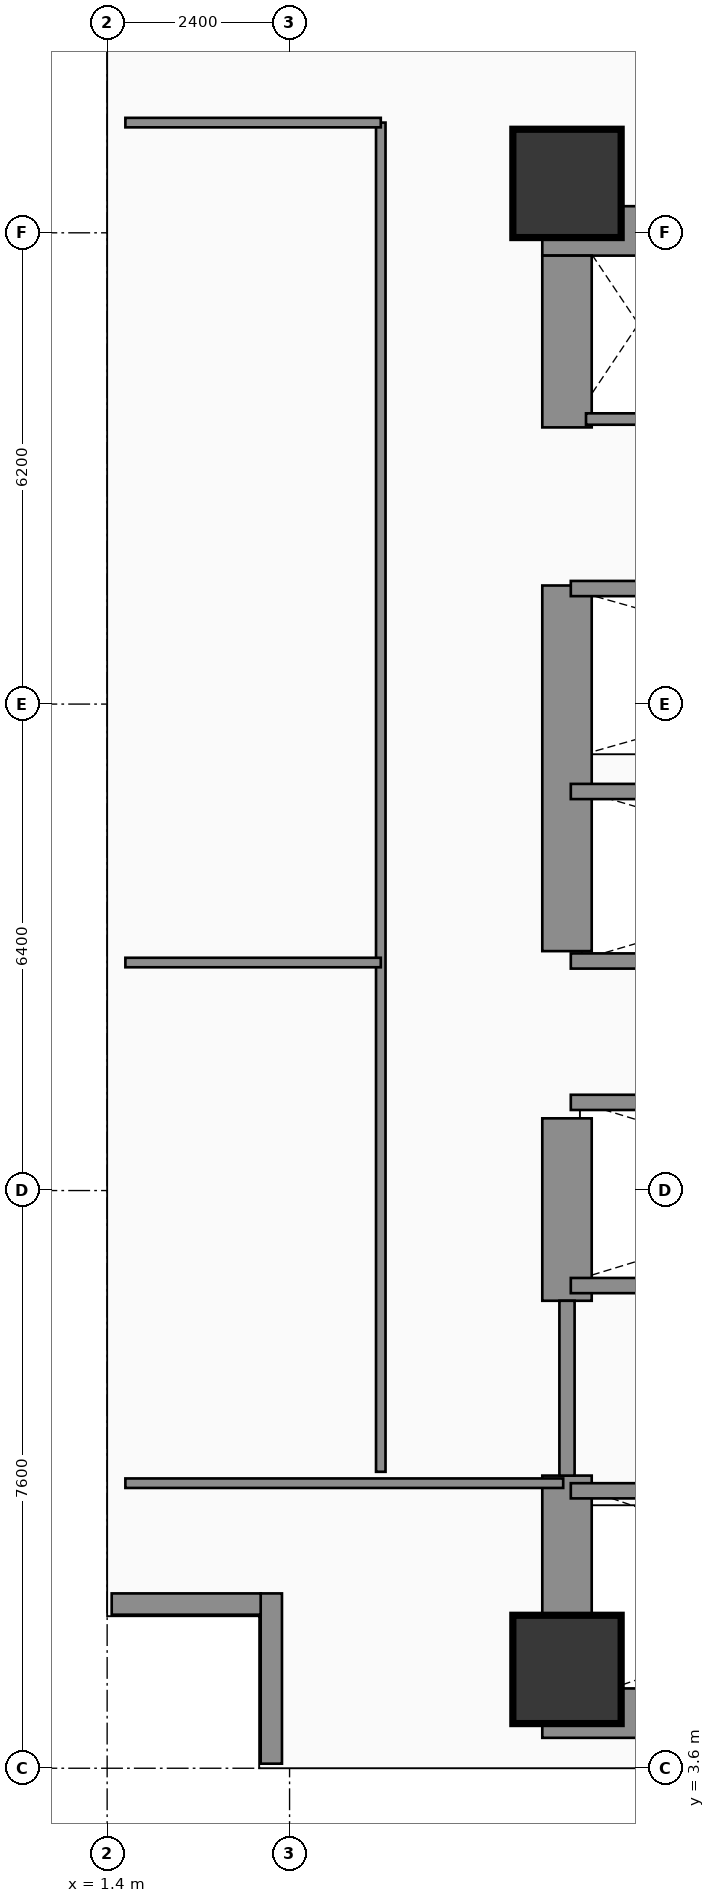
"""IFC4 building model, lengths in metres.
Left out: names, types, materials, properties, quantities, classifications, styles, units other than length and angle.
Written with IfcOpenShell. Run it as: python <this file> out.ifc"""

import sys

from ifc_helpers import new_model, si_unit, direction, frame, frame_2d, origin, origin_2d, place, context, subcontext, project, spatial, rectangle, extrude, element, fill, save


model = new_model("IFC4")
c1 = context("Model", 3, precision=1e-05, world=origin(), true_north=direction((0.0, 1.0)))
c2 = subcontext(c1, "Body", "Model", "MODEL_VIEW")
j1 = project(units=[si_unit("LENGTHUNIT", "METRE"), si_unit("PLANEANGLEUNIT", "RADIAN")], contexts=[c1])
p1 = place(None, origin())
s1 = spatial("IfcSite", under=j1, at=p1, CompositionType="ELEMENT")
p2 = place(p1, origin())
s2 = spatial("IfcBuilding", under=s1, at=p2, CompositionType="ELEMENT")
p3 = place(p2, frame((0.0, 0.0, 110.7)))
s3 = spatial("IfcBuildingStorey", under=s2, at=p3, CompositionType="ELEMENT", Elevation=110.7)
for number, where, z_axis, x_axis in (
    (1, (7.125, 4.325, 0.0), (0.0, 0.0, 1.0), (1.0, 0.0, 0.0)),
    (2, (7.125, 23.825, 0.0), (0.0, 0.0, 1.0), (1.0, 0.0, 0.0)),
):
    element("IfcWall", number, at=place(p3, frame(where, z_axis=z_axis, x_axis=x_axis)), inside=s3, PredefinedType="SHEAR", context=c2, shape_type="SweptSolid", body=[
        extrude(rectangle(XDim=14.0, YDim=0.65, at=frame_2d((7.0, 0.0))), origin(), (0.0, 0.0, 1.0), 3.54),
    ])
p4 = place(p3, frame((7.45, 4.65, 0.0), z_axis=(0.0, 0.0, 1.0), x_axis=(0.0, 1.0, 0.0)))
e3 = element("IfcWall", 3, at=p4, inside=s3, PredefinedType="SHEAR", context=c2, shape_type="SweptSolid", body=[
    extrude(rectangle(XDim=2.8, YDim=0.65, at=frame_2d((1.4, 0.0))), origin(), (0.0, 0.0, 1.0), 3.54),
])
p5 = place(p3, frame((7.45, 9.75, 0.0), z_axis=(0.0, 0.0, 1.0), x_axis=(0.0, 1.0, 0.0)))
e4 = element("IfcWall", 4, at=p5, inside=s3, PredefinedType="SHEAR", context=c2, shape_type="SweptSolid", body=[
    extrude(rectangle(XDim=2.4, YDim=0.65, at=frame_2d((1.2, 0.0))), origin(), (0.0, 0.0, 1.0), 3.54),
])
p6 = place(p3, frame((7.45, 14.35, 0.0), z_axis=(0.0, 0.0, 1.0), x_axis=(0.0, 1.0, 0.0)))
e5 = element("IfcWall", 5, at=p6, inside=s3, PredefinedType="SHEAR", context=c2, shape_type="SweptSolid", body=[
    extrude(rectangle(XDim=4.81, YDim=0.65, at=frame_2d((2.405, 0.0))), origin(), (0.0, 0.0, 1.0), 3.54),
])
p7 = place(p3, frame((7.45, 21.24, 0.0), z_axis=(0.0, 0.0, 1.0), x_axis=(0.0, 1.0, 0.0)))
e6 = element("IfcWall", 6, at=p7, inside=s3, PredefinedType="SHEAR", context=c2, shape_type="SweptSolid", body=[
    extrude(rectangle(XDim=2.26, YDim=0.65, at=frame_2d((1.13, 0.0))), origin(), (0.0, 0.0, 1.0), 3.54),
])
for number, where, z_axis, x_axis in (
    (7, (7.45, 4.9, 0.0), (0.0, 0.0, 1.0), (1.0, 0.0, 0.0)),
    (8, (7.45, 24.45, 0.0), (0.0, 0.0, 1.0), (1.0, 0.0, 0.0)),
):
    element("IfcColumn", number, at=place(p3, frame(where, z_axis=z_axis, x_axis=x_axis)), inside=s3, PredefinedType="COLUMN", context=c2, shape_type="SweptSolid", body=[
        extrude(rectangle(XDim=1.4, YDim=1.4, at=origin_2d()), origin(), (0.0, 0.0, 1.0), 3.54),
    ])
p8 = place(p3, frame((3.56, 3.66, 0.0), z_axis=(0.0, 0.0, 1.0), x_axis=(0.0, 1.0, 0.0)))
e9 = element("IfcWall", 9, at=p8, inside=s3, PredefinedType="SOLIDWALL", context=c2, shape_type="SweptSolid", body=[
    extrude(rectangle(XDim=2.24, YDim=0.28, at=frame_2d((1.12, 0.0))), origin(), (0.0, 0.0, 1.0), 3.54),
])
p9 = place(p3, frame((1.46, 5.76, 0.0), z_axis=(0.0, 0.0, 1.0), x_axis=(1.0, 0.0, 0.0)))
e10 = element("IfcWall", 10, at=p9, inside=s3, PredefinedType="SOLIDWALL", context=c2, shape_type="SweptSolid", body=[
    extrude(rectangle(XDim=1.96, YDim=0.28, at=frame_2d((0.98, 0.0))), origin(), (0.0, 0.0, 1.0), 3.54),
])
p10 = place(p3, frame((7.5, 7.25, 0.0), z_axis=(0.0, 0.0, 1.0), x_axis=(1.0, 0.0, 0.0)))
e11 = element("IfcWall", 11, at=p10, inside=s3, PredefinedType="PARTITIONING", context=c2, shape_type="SweptSolid", body=[
    extrude(rectangle(XDim=8.35, YDim=0.2, at=frame_2d((4.175, 0.0))), origin(), (0.0, 0.0, 1.0), 3.54),
])
p11 = place(p10, frame((0.53, 0.0, 0.0)))
e12 = element("IfcOpeningElement", 12, at=p11, cuts=e11, PredefinedType="OPENING", context=c2, shape_type="SweptSolid", body=[
    extrude(rectangle(XDim=1.1, YDim=2.2, at=frame_2d((0.55, 1.1))), frame((0.0, 0.11, 0.0), z_axis=(0.0, -1.0, 0.0), x_axis=(1.0, 0.0, 0.0)), (0.0, 0.0, 1.0), 0.22),
])
p12 = place(p10, frame((2.37, 0.0, 0.0)))
e13 = element("IfcOpeningElement", 13, at=p12, cuts=e11, PredefinedType="OPENING", context=c2, shape_type="SweptSolid", body=[
    extrude(rectangle(XDim=1.1, YDim=2.2, at=frame_2d((0.55, 1.1))), frame((0.0, 0.11, 0.0), z_axis=(0.0, -1.0, 0.0), x_axis=(1.0, 0.0, 0.0)), (0.0, 0.0, 1.0), 0.22),
])
p13 = place(p10, frame((4.33, 0.0, 0.0)))
e14 = element("IfcOpeningElement", 14, at=p13, cuts=e11, PredefinedType="OPENING", context=c2, shape_type="SweptSolid", body=[
    extrude(rectangle(XDim=1.1, YDim=2.2, at=frame_2d((0.55, 1.1))), frame((0.0, 0.11, 0.0), z_axis=(0.0, -1.0, 0.0), x_axis=(1.0, 0.0, 0.0)), (0.0, 0.0, 1.0), 0.22),
])
p14 = place(p10, frame((6.5, 0.0, 0.0)))
e15 = element("IfcOpeningElement", 15, at=p14, cuts=e11, PredefinedType="OPENING", context=c2, shape_type="SweptSolid", body=[
    extrude(rectangle(XDim=1.1, YDim=2.2, at=frame_2d((0.55, 1.1))), frame((0.0, 0.11, 0.0), z_axis=(0.0, -1.0, 0.0), x_axis=(1.0, 0.0, 0.0)), (0.0, 0.0, 1.0), 0.22),
])
p15 = place(p3, frame((7.5, 9.95, 0.0), z_axis=(0.0, 0.0, 1.0), x_axis=(1.0, 0.0, 0.0)))
e16 = element("IfcWall", 16, at=p15, inside=s3, PredefinedType="PARTITIONING", context=c2, shape_type="SweptSolid", body=[
    extrude(rectangle(XDim=8.35, YDim=0.2, at=frame_2d((4.175, 0.0))), origin(), (0.0, 0.0, 1.0), 3.54),
])
p16 = place(p3, frame((7.45, 7.45, 0.0), z_axis=(0.0, 0.0, 1.0), x_axis=(0.0, 1.0, 0.0)))
e17 = element("IfcWall", 17, at=p16, inside=s3, PredefinedType="PARTITIONING", context=c2, shape_type="SweptSolid", body=[
    extrude(rectangle(XDim=2.3, YDim=0.2, at=frame_2d((1.15, 0.0))), origin(), (0.0, 0.0, 1.0), 2.52),
])
p17 = place(p16, frame((0.633, 0.0, 0.0)))
e18 = element("IfcOpeningElement", 18, at=p17, cuts=e17, PredefinedType="OPENING", context=c2, shape_type="SweptSolid", body=[
    extrude(rectangle(XDim=1.2, YDim=2.25, at=frame_2d((0.6, 1.125))), frame((0.0, 0.11, 0.0), z_axis=(0.0, -1.0, 0.0), x_axis=(1.0, 0.0, 0.0)), (0.0, 0.0, 1.0), 0.22),
])
p18 = place(p3, frame((7.5, 12.36, 0.0), z_axis=(0.0, 0.0, 1.0), x_axis=(1.0, 0.0, 0.0)))
e19 = element("IfcWall", 19, at=p18, inside=s3, PredefinedType="PARTITIONING", context=c2, shape_type="SweptSolid", body=[
    extrude(rectangle(XDim=7.85, YDim=0.2, at=frame_2d((3.925, 0.0))), origin(), (0.0, 0.0, 1.0), 3.54),
])
p19 = place(p18, frame((0.53, 0.0, 0.0)))
e20 = element("IfcOpeningElement", 20, at=p19, cuts=e19, PredefinedType="OPENING", context=c2, shape_type="SweptSolid", body=[
    extrude(rectangle(XDim=1.1, YDim=2.2, at=frame_2d((0.55, 1.1))), frame((0.0, 0.11, 0.0), z_axis=(0.0, -1.0, 0.0), x_axis=(1.0, 0.0, 0.0)), (0.0, 0.0, 1.0), 0.22),
])
p20 = place(p18, frame((2.42, 0.0, 0.0)))
e21 = element("IfcOpeningElement", 21, at=p20, cuts=e19, PredefinedType="OPENING", context=c2, shape_type="SweptSolid", body=[
    extrude(rectangle(XDim=1.1, YDim=2.2, at=frame_2d((0.55, 1.1))), frame((0.0, 0.11, 0.0), z_axis=(0.0, -1.0, 0.0), x_axis=(1.0, 0.0, 0.0)), (0.0, 0.0, 1.0), 0.22),
])
p21 = place(p18, frame((4.31, 0.0, 0.0)))
e22 = element("IfcOpeningElement", 22, at=p21, cuts=e19, PredefinedType="OPENING", context=c2, shape_type="SweptSolid", body=[
    extrude(rectangle(XDim=1.1, YDim=2.2, at=frame_2d((0.55, 1.1))), frame((0.0, 0.11, 0.0), z_axis=(0.0, -1.0, 0.0), x_axis=(1.0, 0.0, 0.0)), (0.0, 0.0, 1.0), 0.22),
])
p22 = place(p18, frame((6.2, 0.0, 0.0)))
e23 = element("IfcOpeningElement", 23, at=p22, cuts=e19, PredefinedType="OPENING", context=c2, shape_type="SweptSolid", body=[
    extrude(rectangle(XDim=1.1, YDim=2.2, at=frame_2d((0.55, 1.1))), frame((0.0, 0.11, 0.0), z_axis=(0.0, -1.0, 0.0), x_axis=(1.0, 0.0, 0.0)), (0.0, 0.0, 1.0), 0.22),
])
p23 = place(p3, frame((7.5, 14.22, 0.0), z_axis=(0.0, 0.0, 1.0), x_axis=(1.0, 0.0, 0.0)))
e24 = element("IfcWall", 24, at=p23, inside=s3, PredefinedType="PARTITIONING", context=c2, shape_type="SweptSolid", body=[
    extrude(rectangle(XDim=7.85, YDim=0.2, at=frame_2d((3.925, 0.0))), origin(), (0.0, 0.0, 1.0), 3.54),
])
p24 = place(p23, frame((0.53, 0.0, 0.0)))
e25 = element("IfcOpeningElement", 25, at=p24, cuts=e24, PredefinedType="OPENING", context=c2, shape_type="SweptSolid", body=[
    extrude(rectangle(XDim=1.1, YDim=2.2, at=frame_2d((0.55, 1.1))), frame((0.0, 0.11, 0.0), z_axis=(0.0, -1.0, 0.0), x_axis=(1.0, 0.0, 0.0)), (0.0, 0.0, 1.0), 0.22),
])
p25 = place(p23, frame((2.42, 0.0, 0.0)))
e26 = element("IfcOpeningElement", 26, at=p25, cuts=e24, PredefinedType="OPENING", context=c2, shape_type="SweptSolid", body=[
    extrude(rectangle(XDim=1.1, YDim=2.2, at=frame_2d((0.55, 1.1))), frame((0.0, 0.11, 0.0), z_axis=(0.0, -1.0, 0.0), x_axis=(1.0, 0.0, 0.0)), (0.0, 0.0, 1.0), 0.22),
])
p26 = place(p23, frame((4.31, 0.0, 0.0)))
e27 = element("IfcOpeningElement", 27, at=p26, cuts=e24, PredefinedType="OPENING", context=c2, shape_type="SweptSolid", body=[
    extrude(rectangle(XDim=1.1, YDim=2.2, at=frame_2d((0.55, 1.1))), frame((0.0, 0.11, 0.0), z_axis=(0.0, -1.0, 0.0), x_axis=(1.0, 0.0, 0.0)), (0.0, 0.0, 1.0), 0.22),
])
p27 = place(p23, frame((6.2, 0.0, 0.0)))
e28 = element("IfcOpeningElement", 28, at=p27, cuts=e24, PredefinedType="OPENING", context=c2, shape_type="SweptSolid", body=[
    extrude(rectangle(XDim=1.1, YDim=2.2, at=frame_2d((0.55, 1.1))), frame((0.0, 0.11, 0.0), z_axis=(0.0, -1.0, 0.0), x_axis=(1.0, 0.0, 0.0)), (0.0, 0.0, 1.0), 0.22),
])
p28 = place(p3, frame((7.5, 16.45, 0.0), z_axis=(0.0, 0.0, 1.0), x_axis=(1.0, 0.0, 0.0)))
e29 = element("IfcWall", 29, at=p28, inside=s3, PredefinedType="PARTITIONING", context=c2, shape_type="SweptSolid", body=[
    extrude(rectangle(XDim=7.85, YDim=0.2, at=frame_2d((3.925, 0.0))), origin(), (0.0, 0.0, 1.0), 3.54),
])
p29 = place(p3, frame((7.5, 19.12, 0.0), z_axis=(0.0, 0.0, 1.0), x_axis=(1.0, 0.0, 0.0)))
e30 = element("IfcWall", 30, at=p29, inside=s3, PredefinedType="PARTITIONING", context=c2, shape_type="SweptSolid", body=[
    extrude(rectangle(XDim=7.85, YDim=0.2, at=frame_2d((3.925, 0.0))), origin(), (0.0, 0.0, 1.0), 3.54),
])
p30 = place(p29, frame((0.53, 0.0, 0.0)))
e31 = element("IfcOpeningElement", 31, at=p30, cuts=e30, PredefinedType="OPENING", context=c2, shape_type="SweptSolid", body=[
    extrude(rectangle(XDim=1.1, YDim=2.2, at=frame_2d((0.55, 1.1))), frame((0.0, 0.11, 0.0), z_axis=(0.0, -1.0, 0.0), x_axis=(1.0, 0.0, 0.0)), (0.0, 0.0, 1.0), 0.22),
])
p31 = place(p29, frame((2.42, 0.0, 0.0)))
e32 = element("IfcOpeningElement", 32, at=p31, cuts=e30, PredefinedType="OPENING", context=c2, shape_type="SweptSolid", body=[
    extrude(rectangle(XDim=1.1, YDim=2.2, at=frame_2d((0.55, 1.1))), frame((0.0, 0.11, 0.0), z_axis=(0.0, -1.0, 0.0), x_axis=(1.0, 0.0, 0.0)), (0.0, 0.0, 1.0), 0.22),
])
p32 = place(p29, frame((4.31, 0.0, 0.0)))
e33 = element("IfcOpeningElement", 33, at=p32, cuts=e30, PredefinedType="OPENING", context=c2, shape_type="SweptSolid", body=[
    extrude(rectangle(XDim=1.1, YDim=2.2, at=frame_2d((0.55, 1.1))), frame((0.0, 0.11, 0.0), z_axis=(0.0, -1.0, 0.0), x_axis=(1.0, 0.0, 0.0)), (0.0, 0.0, 1.0), 0.22),
])
p33 = place(p29, frame((6.2, 0.0, 0.0)))
e34 = element("IfcOpeningElement", 34, at=p33, cuts=e30, PredefinedType="OPENING", context=c2, shape_type="SweptSolid", body=[
    extrude(rectangle(XDim=1.1, YDim=2.2, at=frame_2d((0.55, 1.1))), frame((0.0, 0.11, 0.0), z_axis=(0.0, -1.0, 0.0), x_axis=(1.0, 0.0, 0.0)), (0.0, 0.0, 1.0), 0.22),
])
p34 = place(p3, frame((7.7, 21.35, 0.0), z_axis=(0.0, 0.0, 1.0), x_axis=(1.0, 0.0, 0.0)))
e35 = element("IfcWall", 35, at=p34, inside=s3, PredefinedType="PARTITIONING", context=c2, shape_type="SweptSolid", body=[
    extrude(rectangle(XDim=1.55, YDim=0.15, at=frame_2d((0.775, 0.0))), origin(), (0.0, 0.0, 1.0), 3.54),
])
p35 = place(p34, frame((0.39, 0.0, 0.0)))
e36 = element("IfcOpeningElement", 36, at=p35, cuts=e35, PredefinedType="OPENING", context=c2, shape_type="SweptSolid", body=[
    extrude(rectangle(XDim=0.85, YDim=2.15, at=frame_2d((0.425, 1.075))), frame((0.0, 0.085, 0.0), z_axis=(0.0, -1.0, 0.0), x_axis=(1.0, 0.0, 0.0)), (0.0, 0.0, 1.0), 0.17),
])
p36 = place(p3, frame((1.64, 7.35, 0.0), z_axis=(0.0, 0.0, 1.0), x_axis=(1.0, 0.0, 0.0)))
e37 = element("IfcWall", 37, at=p36, inside=s3, PredefinedType="PARTITIONING", context=c2, shape_type="SweptSolid", body=[
    extrude(rectangle(XDim=5.76, YDim=0.125, at=frame_2d((2.88, 0.0))), origin(), (0.0, 0.0, 1.0), 3.54),
])
p37 = place(p36, frame((4.087, 0.0, 0.0)))
e38 = element("IfcOpeningElement", 38, at=p37, cuts=e37, PredefinedType="OPENING", context=c2, shape_type="SweptSolid", body=[
    extrude(rectangle(XDim=0.85, YDim=2.15, at=frame_2d((0.425, 1.075))), frame((0.0, 0.073, 0.0), z_axis=(0.0, -1.0, 0.0), x_axis=(1.0, 0.0, 0.0)), (0.0, 0.0, 1.0), 0.145),
])
p38 = place(p3, frame((5.0, 7.5, 0.0), z_axis=(0.0, 0.0, 1.0), x_axis=(0.0, 1.0, 0.0)))
e39 = element("IfcWall", 39, at=p38, inside=s3, PredefinedType="PARTITIONING", context=c2, shape_type="SweptSolid", body=[
    extrude(rectangle(XDim=17.75, YDim=0.125, at=frame_2d((8.875, 0.0))), origin(), (0.0, 0.0, 1.0), 3.54),
])
p39 = place(p38, frame((2.85, 0.0, 0.0)))
e40 = element("IfcOpeningElement", 40, at=p39, cuts=e39, PredefinedType="OPENING", context=c2, shape_type="SweptSolid", body=[
    extrude(rectangle(XDim=0.95, YDim=2.15, at=frame_2d((0.475, 1.075))), frame((0.0, 0.073, 0.0), z_axis=(0.0, -1.0, 0.0), x_axis=(1.0, 0.0, 0.0)), (0.0, 0.0, 1.0), 0.145),
])
p40 = place(p38, frame((11.821, 0.0, 0.0)))
e41 = element("IfcOpeningElement", 41, at=p40, cuts=e39, PredefinedType="OPENING", context=c2, shape_type="SweptSolid", body=[
    extrude(rectangle(XDim=0.95, YDim=2.15, at=frame_2d((0.475, 1.075))), frame((0.0, 0.073, 0.0), z_axis=(0.0, -1.0, 0.0), x_axis=(1.0, 0.0, 0.0)), (0.0, 0.0, 1.0), 0.145),
])
for number, where, z_axis, x_axis in (
    (42, (1.64, 25.25, 0.0), (0.0, 0.0, 1.0), (1.0, 0.0, 0.0)),
    (43, (1.64, 14.2, 0.0), (0.0, 0.0, 1.0), (1.0, 0.0, 0.0)),
):
    element("IfcWall", number, at=place(p3, frame(where, z_axis=z_axis, x_axis=x_axis)), inside=s3, PredefinedType="PARTITIONING", context=c2, shape_type="SweptSolid", body=[
        extrude(rectangle(XDim=3.36, YDim=0.125, at=frame_2d((1.68, 0.0))), origin(), (0.0, 0.0, 1.0), 3.54),
    ])
p41 = place(p11, origin())
e44 = element("IfcDoor", 44, at=p41, inside=s3, OperationType="SLIDING_TO_LEFT", PredefinedType="DOOR", context=c2, shape_type="SweptSolid", body=[
    extrude(rectangle(XDim=1.1, YDim=2.2, at=frame_2d((0.55, 1.1))), frame((0.0, 0.025, 0.0), z_axis=(0.0, -1.0, 0.0), x_axis=(1.0, 0.0, 0.0)), (0.0, 0.0, 1.0), 0.05),
])
fill(e12, e44)
p42 = place(p17, frame((1.2, 0.0, 0.0), z_axis=(0.0, 0.0, 1.0), x_axis=(-1.0, 0.0, 0.0)))
e45 = element("IfcDoor", 45, at=p42, inside=s3, OperationType="SINGLE_SWING_LEFT", PredefinedType="DOOR", context=c2, shape_type="SweptSolid", body=[
    extrude(rectangle(XDim=1.2, YDim=2.25, at=frame_2d((0.6, 1.125))), frame((0.0, 0.025, 0.0), z_axis=(0.0, -1.0, 0.0), x_axis=(1.0, 0.0, 0.0)), (0.0, 0.0, 1.0), 0.05),
])
fill(e18, e45)
p43 = place(p19, origin())
e46 = element("IfcDoor", 46, at=p43, inside=s3, OperationType="SLIDING_TO_LEFT", PredefinedType="DOOR", context=c2, shape_type="SweptSolid", body=[
    extrude(rectangle(XDim=1.1, YDim=2.2, at=frame_2d((0.55, 1.1))), frame((0.0, 0.025, 0.0), z_axis=(0.0, -1.0, 0.0), x_axis=(1.0, 0.0, 0.0)), (0.0, 0.0, 1.0), 0.05),
])
fill(e20, e46)
p44 = place(p24, frame((1.1, 0.0, 0.0), z_axis=(0.0, 0.0, 1.0), x_axis=(-1.0, 0.0, 0.0)))
e47 = element("IfcDoor", 47, at=p44, inside=s3, OperationType="SLIDING_TO_LEFT", PredefinedType="DOOR", context=c2, shape_type="SweptSolid", body=[
    extrude(rectangle(XDim=1.1, YDim=2.2, at=frame_2d((0.55, 1.1))), frame((0.0, 0.025, 0.0), z_axis=(0.0, -1.0, 0.0), x_axis=(1.0, 0.0, 0.0)), (0.0, 0.0, 1.0), 0.05),
])
fill(e25, e47)
p45 = place(p30, origin())
e48 = element("IfcDoor", 48, at=p45, inside=s3, OperationType="SLIDING_TO_LEFT", PredefinedType="DOOR", context=c2, shape_type="SweptSolid", body=[
    extrude(rectangle(XDim=1.1, YDim=2.2, at=frame_2d((0.55, 1.1))), frame((0.0, 0.025, 0.0), z_axis=(0.0, -1.0, 0.0), x_axis=(1.0, 0.0, 0.0)), (0.0, 0.0, 1.0), 0.05),
])
fill(e31, e48)
p46 = place(p35, origin())
e49 = element("IfcDoor", 49, at=p46, inside=s3, OperationType="SINGLE_SWING_RIGHT", PredefinedType="DOOR", context=c2, shape_type="SweptSolid", body=[
    extrude(rectangle(XDim=0.85, YDim=2.15, at=frame_2d((0.425, 1.075))), frame((0.0, 0.025, 0.0), z_axis=(0.0, -1.0, 0.0), x_axis=(1.0, 0.0, 0.0)), (0.0, 0.0, 1.0), 0.05),
])
fill(e36, e49)
p47 = place(p37, origin())
e50 = element("IfcDoor", 50, at=p47, inside=s3, OperationType="SINGLE_SWING_RIGHT", PredefinedType="DOOR", context=c2, shape_type="SweptSolid", body=[
    extrude(rectangle(XDim=0.85, YDim=2.15, at=frame_2d((0.425, 1.075))), frame((0.0, 0.025, 0.0), z_axis=(0.0, -1.0, 0.0), x_axis=(1.0, 0.0, 0.0)), (0.0, 0.0, 1.0), 0.05),
])
fill(e38, e50)
p48 = place(p39, origin())
e51 = element("IfcDoor", 51, at=p48, inside=s3, OperationType="SINGLE_SWING_LEFT", PredefinedType="DOOR", context=c2, shape_type="SweptSolid", body=[
    extrude(rectangle(XDim=0.95, YDim=2.15, at=frame_2d((0.475, 1.075))), frame((0.0, 0.025, 0.0), z_axis=(0.0, -1.0, 0.0), x_axis=(1.0, 0.0, 0.0)), (0.0, 0.0, 1.0), 0.05),
])
fill(e40, e51)
p49 = place(p40, origin())
e52 = element("IfcDoor", 52, at=p49, inside=s3, OperationType="SINGLE_SWING_RIGHT", PredefinedType="DOOR", context=c2, shape_type="SweptSolid", body=[
    extrude(rectangle(XDim=0.95, YDim=2.15, at=frame_2d((0.475, 1.075))), frame((0.0, 0.025, 0.0), z_axis=(0.0, -1.0, 0.0), x_axis=(1.0, 0.0, 0.0)), (0.0, 0.0, 1.0), 0.05),
])
fill(e41, e52)
save(model, sys.argv[1])
